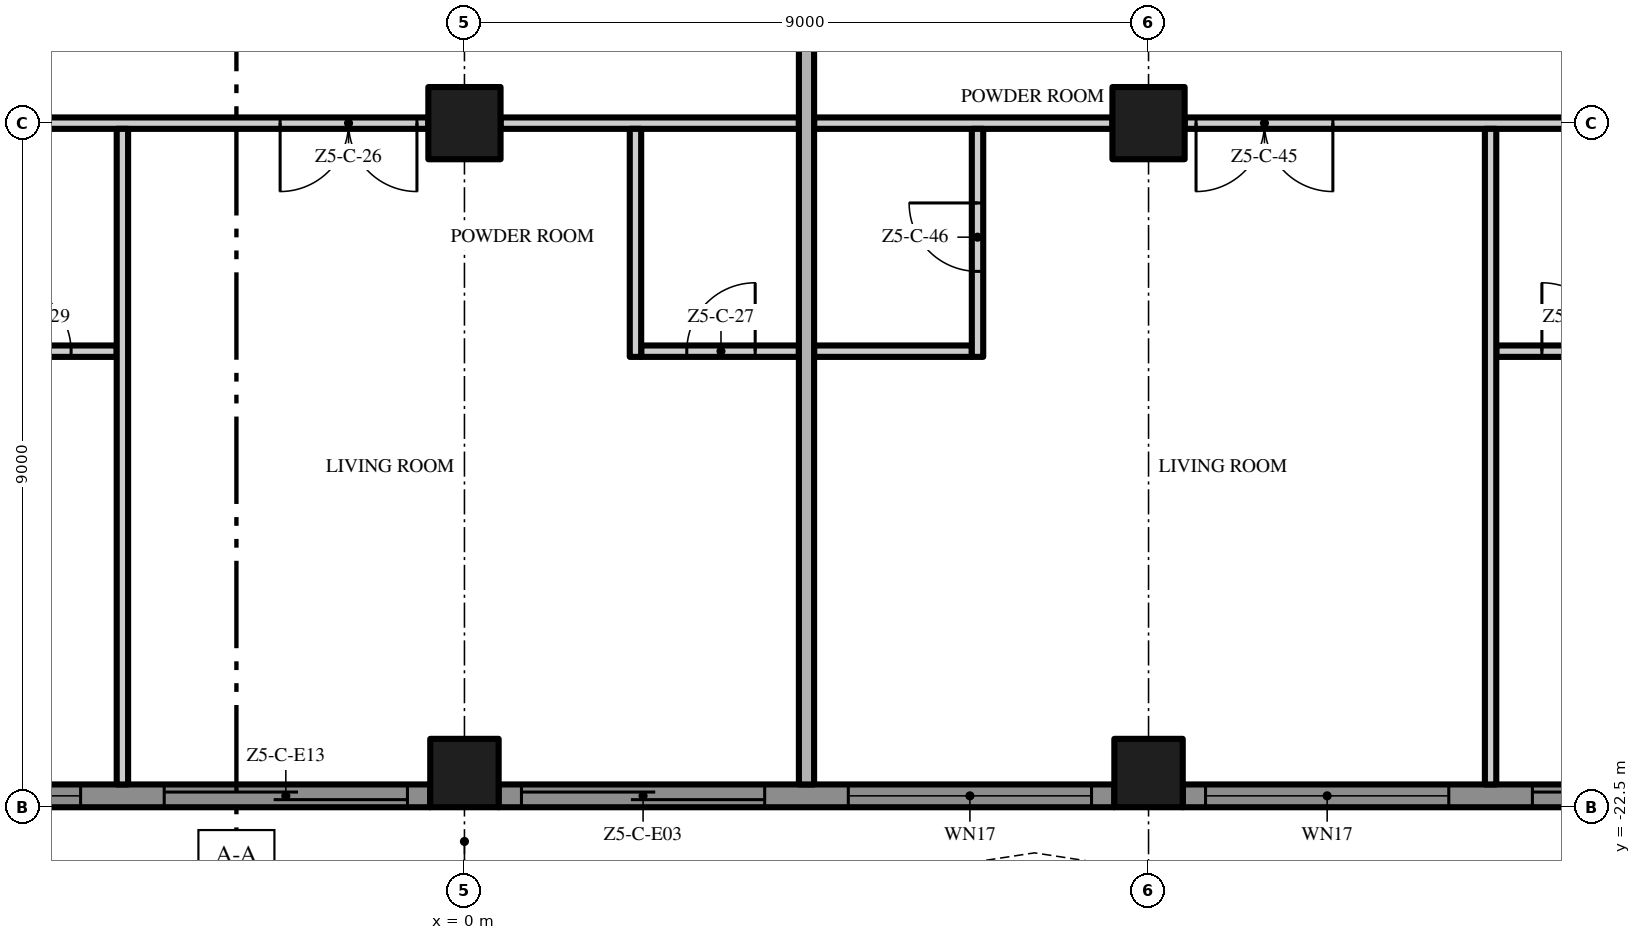
"""IFC4 building model, lengths in metres.
Left out: names, types, materials, properties, quantities, classifications, styles, units other than length and angle.
Written with IfcOpenShell. Run it as: python <this file> out.ifc"""

import sys

from ifc_helpers import new_model, si_unit, direction, frame, frame_2d, origin, origin_2d, place, context, subcontext, project, spatial, polyline, rectangle, outline, extrude, element, fill, save


model = new_model("IFC4")
c1 = context("Model", 3, precision=1e-05, world=origin(), true_north=direction((0.0, 1.0)))
c2 = subcontext(c1, "Body", "Model", "MODEL_VIEW")
j1 = project(units=[si_unit("LENGTHUNIT", "METRE"), si_unit("PLANEANGLEUNIT", "RADIAN")], contexts=[c1])
p1 = place(None, origin())
s1 = spatial("IfcSite", under=j1, at=p1, CompositionType="ELEMENT")
p2 = place(p1, origin())
s2 = spatial("IfcBuilding", under=s1, at=p2, CompositionType="ELEMENT")
p3 = place(p2, frame((0.0, 0.0, 265.4)))
s3 = spatial("IfcBuildingStorey", under=s2, at=p3, CompositionType="ELEMENT", Elevation=265.4)
p4 = place(p3, frame((0.0, -13.5, 0.0), z_axis=(0.0, 0.0, 1.0), x_axis=(1.0, 0.0, 0.0)))
e1 = element("IfcColumn", 1, at=p4, inside=s3, PredefinedType="COLUMN", context=c2, shape_type="SweptSolid", body=[
    extrude(rectangle(XDim=0.95, YDim=0.95, at=origin_2d()), origin(), (0.0, 0.0, 1.0), 3.5),
])
p5 = place(p3, frame((0.0, -22.05, 0.0), z_axis=(0.0, 0.0, 1.0), x_axis=(1.0, 0.0, 0.0)))
e2 = element("IfcColumn", 2, at=p5, inside=s3, PredefinedType="COLUMN", context=c2, shape_type="SweptSolid", body=[
    extrude(rectangle(XDim=0.9, YDim=0.9, at=origin_2d()), origin(), (0.0, 0.0, 1.0), 3.5),
])
p6 = place(p3, frame((9.0, -13.5, 0.0), z_axis=(0.0, 0.0, 1.0), x_axis=(1.0, 0.0, 0.0)))
e3 = element("IfcColumn", 3, at=p6, inside=s3, PredefinedType="COLUMN", context=c2, shape_type="SweptSolid", body=[
    extrude(rectangle(XDim=0.95, YDim=0.95, at=origin_2d()), origin(), (0.0, 0.0, 1.0), 3.5),
])
p7 = place(p3, frame((9.0, -22.05, 0.0), z_axis=(0.0, 0.0, 1.0), x_axis=(1.0, 0.0, 0.0)))
e4 = element("IfcColumn", 4, at=p7, inside=s3, PredefinedType="COLUMN", context=c2, shape_type="SweptSolid", body=[
    extrude(rectangle(XDim=0.9, YDim=0.9, at=origin_2d()), origin(), (0.0, 0.0, 1.0), 3.5),
])
p8 = place(p3, frame((-0.45, -22.35, 0.0), z_axis=(0.0, 0.0, 1.0), x_axis=(-1.0, 0.0, 0.0)))
e5 = element("IfcWall", 5, at=p8, inside=s3, PredefinedType="SOLIDWALL", context=c2, shape_type="SweptSolid", body=[
    extrude(rectangle(XDim=8.1, YDim=0.3, at=frame_2d((4.05, 0.0))), origin(), (0.0, 0.0, 1.0), 3.5),
])
p9 = place(p8, frame((4.6, 0.0, 0.45)))
e6 = element("IfcOpeningElement", 6, at=p9, cuts=e5, PredefinedType="OPENING", context=c2, shape_type="SweptSolid", body=[
    extrude(rectangle(XDim=3.2, YDim=2.65, at=frame_2d((1.6, 1.325))), frame((0.0, 0.16, 0.0), z_axis=(0.0, -1.0, 0.0), x_axis=(1.0, 0.0, 0.0)), (0.0, 0.0, 1.0), 0.32),
])
p10 = place(p8, frame((0.3, 0.0, 0.0)))
e7 = element("IfcOpeningElement", 7, at=p10, cuts=e5, PredefinedType="OPENING", context=c2, shape_type="SweptSolid", body=[
    extrude(rectangle(XDim=3.2, YDim=2.4, at=frame_2d((1.6, 1.2))), frame((0.0, 0.16, 0.0), z_axis=(0.0, -1.0, 0.0), x_axis=(1.0, 0.0, 0.0)), (0.0, 0.0, 1.0), 0.32),
])
p11 = place(p3, frame((8.55, -22.35, 0.0), z_axis=(0.0, 0.0, 1.0), x_axis=(-1.0, 0.0, 0.0)))
e8 = element("IfcWall", 8, at=p11, inside=s3, PredefinedType="SOLIDWALL", context=c2, shape_type="SweptSolid", body=[
    extrude(rectangle(XDim=8.1, YDim=0.3, at=frame_2d((4.05, 0.0))), origin(), (0.0, 0.0, 1.0), 3.5),
])
p12 = place(p11, frame((4.6, 0.0, 0.0)))
e9 = element("IfcOpeningElement", 9, at=p12, cuts=e8, PredefinedType="OPENING", context=c2, shape_type="SweptSolid", body=[
    extrude(rectangle(XDim=3.2, YDim=2.4, at=frame_2d((1.6, 1.2))), frame((0.0, 0.16, 0.0), z_axis=(0.0, -1.0, 0.0), x_axis=(1.0, 0.0, 0.0)), (0.0, 0.0, 1.0), 0.32),
])
p13 = place(p11, frame((0.3, 0.0, 0.45)))
e10 = element("IfcOpeningElement", 10, at=p13, cuts=e8, PredefinedType="OPENING", context=c2, shape_type="SweptSolid", body=[
    extrude(rectangle(XDim=3.2, YDim=2.65, at=frame_2d((1.6, 1.325))), frame((0.0, 0.16, 0.0), z_axis=(0.0, -1.0, 0.0), x_axis=(1.0, 0.0, 0.0)), (0.0, 0.0, 1.0), 0.32),
])
p14 = place(p3, frame((17.55, -22.35, 0.0), z_axis=(0.0, 0.0, 1.0), x_axis=(-1.0, 0.0, 0.0)))
e11 = element("IfcWall", 11, at=p14, inside=s3, PredefinedType="SOLIDWALL", context=c2, shape_type="SweptSolid", body=[
    extrude(rectangle(XDim=8.1, YDim=0.3, at=frame_2d((4.05, 0.0))), origin(), (0.0, 0.0, 1.0), 3.5),
])
p15 = place(p14, frame((4.6, 0.0, 0.45)))
e12 = element("IfcOpeningElement", 12, at=p15, cuts=e11, PredefinedType="OPENING", context=c2, shape_type="SweptSolid", body=[
    extrude(rectangle(XDim=3.2, YDim=2.65, at=frame_2d((1.6, 1.325))), frame((0.0, 0.16, 0.0), z_axis=(0.0, -1.0, 0.0), x_axis=(1.0, 0.0, 0.0)), (0.0, 0.0, 1.0), 0.32),
])
p16 = place(p14, frame((0.3, 0.0, 0.0)))
e13 = element("IfcOpeningElement", 13, at=p16, cuts=e11, PredefinedType="OPENING", context=c2, shape_type="SweptSolid", body=[
    extrude(rectangle(XDim=3.2, YDim=2.4, at=frame_2d((1.6, 1.2))), frame((0.0, 0.16, 0.0), z_axis=(0.0, -1.0, 0.0), x_axis=(1.0, 0.0, 0.0)), (0.0, 0.0, 1.0), 0.32),
])
p17 = place(p3, origin())
e14 = element("IfcWall", 14, at=p17, inside=s3, PredefinedType="USERDEFINED", context=c2, shape_type="SweptSolid", body=[
    extrude(outline(polyline([(-22.5, -23.1), (-21.0, -23.329), (-19.5, -23.929), (-18.0, -24.671), (-16.5, -25.271), (-15.0, -25.5), (-13.5, -25.271), (-12.0, -24.671), (-10.5, -23.929), (-9.0, -23.329), (-7.5, -23.1), (-6.0, -23.329), (-4.5, -23.929), (-3.0, -24.671), (-1.5, -25.271), (0.0, -25.5), (1.5, -25.271), (3.0, -24.671), (4.5, -23.929), (6.0, -23.329), (7.5, -23.1), (9.0, -23.329), (10.5, -23.929), (12.0, -24.671), (13.5, -25.271), (15.0, -25.5), (16.5, -25.271), (18.0, -24.671), (19.5, -23.929), (21.0, -23.329), (22.5, -23.1), (22.462, -22.853), (20.934, -23.086), (19.398, -23.701), (17.898, -24.442), (16.434, -25.028), (15.0, -25.247), (13.566, -25.028), (12.102, -24.442), (10.602, -23.701), (9.066, -23.086), (7.5, -22.847), (5.934, -23.086), (4.398, -23.701), (2.898, -24.442), (1.434, -25.028), (0.0, -25.247), (-1.434, -25.028), (-2.898, -24.442), (-4.398, -23.701), (-5.934, -23.086), (-7.5, -22.847), (-9.066, -23.086), (-10.602, -23.701), (-12.102, -24.442), (-13.566, -25.028), (-15.0, -25.247), (-16.434, -25.028), (-17.898, -24.442), (-19.398, -23.701), (-20.934, -23.086), (-22.462, -22.853), (-22.5, -23.1)])), origin(), (0.0, 0.0, 1.0), 0.9),
])
p18 = place(p3, frame((-6.675, -16.5, 0.0), z_axis=(0.0, 0.0, 1.0), x_axis=(1.0, 0.0, 0.0)))
e15 = element("IfcWall", 15, at=p18, inside=s3, PredefinedType="PARTITIONING", context=c2, shape_type="SweptSolid", body=[
    extrude(rectangle(XDim=2.1, YDim=0.15, at=frame_2d((1.05, 0.0))), origin(), (0.0, 0.0, 1.0), 3.5),
])
p19 = place(p18, frame((0.6, 0.0, 0.0)))
e16 = element("IfcOpeningElement", 16, at=p19, cuts=e15, PredefinedType="OPENING", context=c2, shape_type="SweptSolid", body=[
    extrude(rectangle(XDim=0.9, YDim=2.1, at=frame_2d((0.45, 1.05))), frame((0.0, 0.085, 0.0), z_axis=(0.0, -1.0, 0.0), x_axis=(1.0, 0.0, 0.0)), (0.0, 0.0, 1.0), 0.17),
])
p20 = place(p3, frame((2.325, -16.5, 0.0), z_axis=(0.0, 0.0, 1.0), x_axis=(1.0, 0.0, 0.0)))
e17 = element("IfcWall", 17, at=p20, inside=s3, PredefinedType="PARTITIONING", context=c2, shape_type="SweptSolid", body=[
    extrude(rectangle(XDim=2.075, YDim=0.15, at=frame_2d((1.038, 0.0))), origin(), (0.0, 0.0, 1.0), 3.5),
])
p21 = place(p20, frame((0.6, 0.0, 0.0)))
e18 = element("IfcOpeningElement", 18, at=p21, cuts=e17, PredefinedType="OPENING", context=c2, shape_type="SweptSolid", body=[
    extrude(rectangle(XDim=0.9, YDim=2.1, at=frame_2d((0.45, 1.05))), frame((0.0, 0.085, 0.0), z_axis=(0.0, -1.0, 0.0), x_axis=(1.0, 0.0, 0.0)), (0.0, 0.0, 1.0), 0.17),
])
p22 = place(p3, frame((4.6, -16.5, 0.0), z_axis=(0.0, 0.0, 1.0), x_axis=(1.0, 0.0, 0.0)))
e19 = element("IfcWall", 19, at=p22, inside=s3, PredefinedType="PARTITIONING", context=c2, shape_type="SweptSolid", body=[
    extrude(rectangle(XDim=2.075, YDim=0.15, at=frame_2d((1.038, 0.0))), origin(), (0.0, 0.0, 1.0), 3.5),
])
p23 = place(p3, frame((13.575, -16.5, 0.0), z_axis=(0.0, 0.0, 1.0), x_axis=(1.0, 0.0, 0.0)))
e20 = element("IfcWall", 20, at=p23, inside=s3, PredefinedType="PARTITIONING", context=c2, shape_type="SweptSolid", body=[
    extrude(rectangle(XDim=2.1, YDim=0.15, at=frame_2d((1.05, 0.0))), origin(), (0.0, 0.0, 1.0), 3.5),
])
p24 = place(p23, frame((0.6, 0.0, 0.0)))
e21 = element("IfcOpeningElement", 21, at=p24, cuts=e20, PredefinedType="OPENING", context=c2, shape_type="SweptSolid", body=[
    extrude(rectangle(XDim=0.9, YDim=2.1, at=frame_2d((0.45, 1.05))), frame((0.0, 0.085, 0.0), z_axis=(0.0, -1.0, 0.0), x_axis=(1.0, 0.0, 0.0)), (0.0, 0.0, 1.0), 0.17),
])
p25 = place(p3, frame((-0.475, -13.5, 0.0), z_axis=(0.0, 0.0, 1.0), x_axis=(-1.0, 0.0, 0.0)))
e22 = element("IfcWall", 22, at=p25, inside=s3, PredefinedType="PARTITIONING", context=c2, shape_type="SweptSolid", body=[
    extrude(rectangle(XDim=8.05, YDim=0.15, at=frame_2d((4.025, 0.0))), origin(), (0.0, 0.0, 1.0), 3.5),
])
p26 = place(p25, frame((0.15, 0.0, 0.0)))
e23 = element("IfcOpeningElement", 23, at=p26, cuts=e22, PredefinedType="OPENING", context=c2, shape_type="SweptSolid", body=[
    extrude(rectangle(XDim=1.8, YDim=2.4, at=frame_2d((0.9, 1.2))), frame((0.0, 0.085, 0.0), z_axis=(0.0, -1.0, 0.0), x_axis=(1.0, 0.0, 0.0)), (0.0, 0.0, 1.0), 0.17),
])
p27 = place(p25, frame((6.9, 0.0, 0.0)))
e24 = element("IfcOpeningElement", 24, at=p27, cuts=e22, PredefinedType="OPENING", context=c2, shape_type="SweptSolid", body=[
    extrude(rectangle(XDim=1.0, YDim=2.4, at=frame_2d((0.5, 1.2))), frame((0.0, 0.085, 0.0), z_axis=(0.0, -1.0, 0.0), x_axis=(1.0, 0.0, 0.0)), (0.0, 0.0, 1.0), 0.17),
])
for number, where, z_axis, x_axis in (
    (25, (0.475, -13.5, 0.0), (0.0, 0.0, 1.0), (1.0, 0.0, 0.0)),
    (26, (4.6, -13.5, 0.0), (0.0, 0.0, 1.0), (1.0, 0.0, 0.0)),
):
    element("IfcWall", number, at=place(p3, frame(where, z_axis=z_axis, x_axis=x_axis)), inside=s3, PredefinedType="PARTITIONING", context=c2, shape_type="SweptSolid", body=[
        extrude(rectangle(XDim=3.925, YDim=0.15, at=frame_2d((1.962, 0.0))), origin(), (0.0, 0.0, 1.0), 3.5),
    ])
p28 = place(p3, frame((17.525, -13.5, 0.0), z_axis=(0.0, 0.0, 1.0), x_axis=(-1.0, 0.0, 0.0)))
e27 = element("IfcWall", 27, at=p28, inside=s3, PredefinedType="PARTITIONING", context=c2, shape_type="SweptSolid", body=[
    extrude(rectangle(XDim=8.05, YDim=0.15, at=frame_2d((4.025, 0.0))), origin(), (0.0, 0.0, 1.0), 3.5),
])
p29 = place(p28, frame((6.1, 0.0, 0.0)))
e28 = element("IfcOpeningElement", 28, at=p29, cuts=e27, PredefinedType="OPENING", context=c2, shape_type="SweptSolid", body=[
    extrude(rectangle(XDim=1.8, YDim=2.4, at=frame_2d((0.9, 1.2))), frame((0.0, 0.085, 0.0), z_axis=(0.0, -1.0, 0.0), x_axis=(1.0, 0.0, 0.0)), (0.0, 0.0, 1.0), 0.17),
])
p30 = place(p28, frame((0.15, 0.0, 0.0)))
e29 = element("IfcOpeningElement", 29, at=p30, cuts=e27, PredefinedType="OPENING", context=c2, shape_type="SweptSolid", body=[
    extrude(rectangle(XDim=1.0, YDim=2.4, at=frame_2d((0.5, 1.2))), frame((0.0, 0.085, 0.0), z_axis=(0.0, -1.0, 0.0), x_axis=(1.0, 0.0, 0.0)), (0.0, 0.0, 1.0), 0.17),
])
p31 = place(p3, frame((-4.5, -22.2, 0.0), z_axis=(0.0, 0.0, 1.0), x_axis=(0.0, 1.0, 0.0)))
e30 = element("IfcWall", 30, at=p31, inside=s3, PredefinedType="PARTITIONING", context=c2, shape_type="SweptSolid", body=[
    extrude(rectangle(XDim=8.625, YDim=0.15, at=frame_2d((4.312, 0.0))), origin(), (0.0, 0.0, 1.0), 3.5),
])
p32 = place(p3, frame((2.25, -16.575, 0.0), z_axis=(0.0, 0.0, 1.0), x_axis=(0.0, 1.0, 0.0)))
e31 = element("IfcWall", 31, at=p32, inside=s3, PredefinedType="PARTITIONING", context=c2, shape_type="SweptSolid", body=[
    extrude(rectangle(XDim=3.0, YDim=0.15, at=frame_2d((1.5, 0.0))), origin(), (0.0, 0.0, 1.0), 3.5),
])
p33 = place(p3, frame((4.5, -22.2, 0.0), z_axis=(0.0, 0.0, 1.0), x_axis=(0.0, 1.0, 0.0)))
e32 = element("IfcWall", 32, at=p33, inside=s3, PredefinedType="PARTITIONING", context=c2, shape_type="SweptSolid", body=[
    extrude(rectangle(XDim=22.1, YDim=0.2, at=frame_2d((11.05, 0.0))), origin(), (0.0, 0.0, 1.0), 3.5),
])
p34 = place(p3, frame((6.75, -16.575, 0.0), z_axis=(0.0, 0.0, 1.0), x_axis=(0.0, 1.0, 0.0)))
e33 = element("IfcWall", 33, at=p34, inside=s3, PredefinedType="PARTITIONING", context=c2, shape_type="SweptSolid", body=[
    extrude(rectangle(XDim=3.0, YDim=0.15, at=frame_2d((1.5, 0.0))), origin(), (0.0, 0.0, 1.0), 3.5),
])
p35 = place(p34, frame((1.125, 0.0, 0.0)))
e34 = element("IfcOpeningElement", 34, at=p35, cuts=e33, PredefinedType="OPENING", context=c2, shape_type="SweptSolid", body=[
    extrude(rectangle(XDim=0.9, YDim=2.1, at=frame_2d((0.45, 1.05))), frame((0.0, 0.085, 0.0), z_axis=(0.0, -1.0, 0.0), x_axis=(1.0, 0.0, 0.0)), (0.0, 0.0, 1.0), 0.17),
])
p36 = place(p3, frame((13.5, -22.2, 0.0), z_axis=(0.0, 0.0, 1.0), x_axis=(0.0, 1.0, 0.0)))
e35 = element("IfcWall", 35, at=p36, inside=s3, PredefinedType="PARTITIONING", context=c2, shape_type="SweptSolid", body=[
    extrude(rectangle(XDim=8.625, YDim=0.15, at=frame_2d((4.312, 0.0))), origin(), (0.0, 0.0, 1.0), 3.5),
])
p37 = place(p9, origin())
e36 = element("IfcWindow", 36, at=p37, inside=s3, PartitioningType="SINGLE_PANEL", PredefinedType="WINDOW", context=c2, shape_type="SweptSolid", body=[
    extrude(rectangle(XDim=3.2, YDim=2.65, at=frame_2d((1.6, 1.325))), frame((0.0, 0.03, 0.0), z_axis=(0.0, -1.0, 0.0), x_axis=(1.0, 0.0, 0.0)), (0.0, 0.0, 1.0), 0.06),
])
fill(e6, e36)
p38 = place(p10, origin())
e37 = element("IfcDoor", 37, at=p38, inside=s3, OperationType="SINGLE_SWING_LEFT", PredefinedType="DOOR", context=c2, shape_type="SweptSolid", body=[
    extrude(rectangle(XDim=3.2, YDim=2.4, at=frame_2d((1.6, 1.2))), frame((0.0, 0.025, 0.0), z_axis=(0.0, -1.0, 0.0), x_axis=(1.0, 0.0, 0.0)), (0.0, 0.0, 1.0), 0.05),
])
fill(e7, e37)
p39 = place(p12, origin())
e38 = element("IfcDoor", 38, at=p39, inside=s3, OperationType="SINGLE_SWING_LEFT", PredefinedType="DOOR", context=c2, shape_type="SweptSolid", body=[
    extrude(rectangle(XDim=3.2, YDim=2.4, at=frame_2d((1.6, 1.2))), frame((0.0, 0.025, 0.0), z_axis=(0.0, -1.0, 0.0), x_axis=(1.0, 0.0, 0.0)), (0.0, 0.0, 1.0), 0.05),
])
fill(e9, e38)
p40 = place(p13, origin())
e39 = element("IfcWindow", 39, at=p40, inside=s3, PartitioningType="SINGLE_PANEL", PredefinedType="WINDOW", context=c2, shape_type="SweptSolid", body=[
    extrude(rectangle(XDim=3.2, YDim=2.65, at=frame_2d((1.6, 1.325))), frame((0.0, 0.03, 0.0), z_axis=(0.0, -1.0, 0.0), x_axis=(1.0, 0.0, 0.0)), (0.0, 0.0, 1.0), 0.06),
])
fill(e10, e39)
p41 = place(p15, origin())
e40 = element("IfcWindow", 40, at=p41, inside=s3, PartitioningType="SINGLE_PANEL", PredefinedType="WINDOW", context=c2, shape_type="SweptSolid", body=[
    extrude(rectangle(XDim=3.2, YDim=2.65, at=frame_2d((1.6, 1.325))), frame((0.0, 0.03, 0.0), z_axis=(0.0, -1.0, 0.0), x_axis=(1.0, 0.0, 0.0)), (0.0, 0.0, 1.0), 0.06),
])
fill(e12, e40)
p42 = place(p16, origin())
e41 = element("IfcDoor", 41, at=p42, inside=s3, OperationType="SINGLE_SWING_LEFT", PredefinedType="DOOR", context=c2, shape_type="SweptSolid", body=[
    extrude(rectangle(XDim=3.2, YDim=2.4, at=frame_2d((1.6, 1.2))), frame((0.0, 0.025, 0.0), z_axis=(0.0, -1.0, 0.0), x_axis=(1.0, 0.0, 0.0)), (0.0, 0.0, 1.0), 0.05),
])
fill(e13, e41)
p43 = place(p26, origin())
e42 = element("IfcDoor", 42, at=p43, inside=s3, OperationType="DOUBLE_DOOR_SINGLE_SWING", PredefinedType="DOOR", context=c2, shape_type="SweptSolid", body=[
    extrude(rectangle(XDim=1.8, YDim=2.4, at=frame_2d((0.9, 1.2))), frame((0.0, 0.025, 0.0), z_axis=(0.0, -1.0, 0.0), x_axis=(1.0, 0.0, 0.0)), (0.0, 0.0, 1.0), 0.05),
])
fill(e23, e42)
p44 = place(p21, origin())
e43 = element("IfcDoor", 43, at=p44, inside=s3, OperationType="SINGLE_SWING_RIGHT", PredefinedType="DOOR", context=c2, shape_type="SweptSolid", body=[
    extrude(rectangle(XDim=0.9, YDim=2.1, at=frame_2d((0.45, 1.05))), frame((0.0, 0.025, 0.0), z_axis=(0.0, -1.0, 0.0), x_axis=(1.0, 0.0, 0.0)), (0.0, 0.0, 1.0), 0.05),
])
fill(e18, e43)
p45 = place(p19, origin())
e44 = element("IfcDoor", 44, at=p45, inside=s3, OperationType="SINGLE_SWING_LEFT", PredefinedType="DOOR", context=c2, shape_type="SweptSolid", body=[
    extrude(rectangle(XDim=0.9, YDim=2.1, at=frame_2d((0.45, 1.05))), frame((0.0, 0.025, 0.0), z_axis=(0.0, -1.0, 0.0), x_axis=(1.0, 0.0, 0.0)), (0.0, 0.0, 1.0), 0.05),
])
fill(e16, e44)
p46 = place(p29, origin())
e45 = element("IfcDoor", 45, at=p46, inside=s3, OperationType="DOUBLE_DOOR_SINGLE_SWING", PredefinedType="DOOR", context=c2, shape_type="SweptSolid", body=[
    extrude(rectangle(XDim=1.8, YDim=2.4, at=frame_2d((0.9, 1.2))), frame((0.0, 0.025, 0.0), z_axis=(0.0, -1.0, 0.0), x_axis=(1.0, 0.0, 0.0)), (0.0, 0.0, 1.0), 0.05),
])
fill(e28, e45)
p47 = place(p35, origin())
e46 = element("IfcDoor", 46, at=p47, inside=s3, OperationType="SINGLE_SWING_RIGHT", PredefinedType="DOOR", context=c2, shape_type="SweptSolid", body=[
    extrude(rectangle(XDim=0.9, YDim=2.1, at=frame_2d((0.45, 1.05))), frame((0.0, 0.025, 0.0), z_axis=(0.0, -1.0, 0.0), x_axis=(1.0, 0.0, 0.0)), (0.0, 0.0, 1.0), 0.05),
])
fill(e34, e46)
p48 = place(p24, origin())
e47 = element("IfcDoor", 47, at=p48, inside=s3, OperationType="SINGLE_SWING_LEFT", PredefinedType="DOOR", context=c2, shape_type="SweptSolid", body=[
    extrude(rectangle(XDim=0.9, YDim=2.1, at=frame_2d((0.45, 1.05))), frame((0.0, 0.025, 0.0), z_axis=(0.0, -1.0, 0.0), x_axis=(1.0, 0.0, 0.0)), (0.0, 0.0, 1.0), 0.05),
])
fill(e21, e47)
save(model, sys.argv[1])
